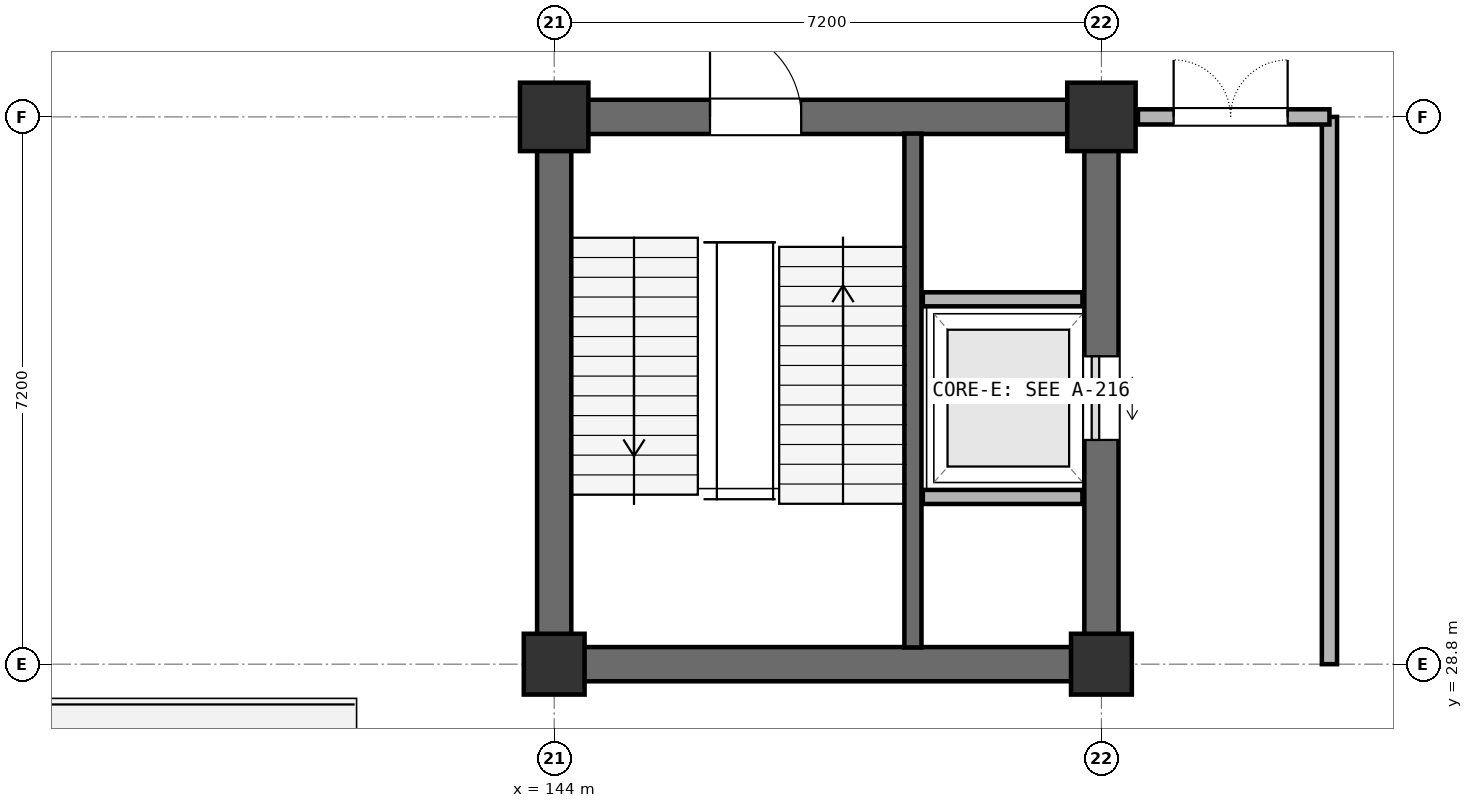
"""IFC4 building model, lengths in metres.
Left out: names, types, materials, properties, quantities, classifications, styles, units other than length and angle.
Written with IfcOpenShell. Run it as: python <this file> out.ifc"""

import sys

from ifc_helpers import new_model, si_unit, direction, frame, frame_2d, origin, origin_2d, place, context, subcontext, project, spatial, rectangle, extrude, element, fill, save


model = new_model("IFC4")
c1 = context("Model", 3, precision=1e-05, world=origin(), true_north=direction((0.0, 1.0)))
c2 = subcontext(c1, "Body", "Model", "MODEL_VIEW")
j1 = project(units=[si_unit("LENGTHUNIT", "METRE"), si_unit("PLANEANGLEUNIT", "RADIAN")], contexts=[c1])
p1 = place(None, origin())
s1 = spatial("IfcSite", under=j1, at=p1, CompositionType="ELEMENT")
p2 = place(p1, origin())
s2 = spatial("IfcBuilding", under=s1, at=p2, CompositionType="ELEMENT")
p3 = place(p2, frame((0.0, 0.0, -4.8)))
s3 = spatial("IfcBuildingStorey", under=s2, at=p3, CompositionType="ELEMENT", Elevation=-4.8)
p4 = place(p3, frame((144.0, 28.8, 0.0), z_axis=(0.0, 0.0, 1.0), x_axis=(1.0, 0.0, 0.0)))
e1 = element("IfcColumn", 1, at=p4, inside=s3, PredefinedType="COLUMN", context=c2, shape_type="SweptSolid", body=[
    extrude(rectangle(XDim=0.8, YDim=0.8, at=origin_2d()), origin(), (0.0, 0.0, 1.0), 4.8),
])
p5 = place(p3, frame((144.0, 36.0, 0.0), z_axis=(0.0, 0.0, 1.0), x_axis=(1.0, 0.0, 0.0)))
e2 = element("IfcColumn", 2, at=p5, inside=s3, PredefinedType="COLUMN", context=c2, shape_type="SweptSolid", body=[
    extrude(rectangle(XDim=0.9, YDim=0.9, at=origin_2d()), origin(), (0.0, 0.0, 1.0), 4.8),
])
p6 = place(p3, frame((151.2, 28.8, 0.0), z_axis=(0.0, 0.0, 1.0), x_axis=(1.0, 0.0, 0.0)))
e3 = element("IfcColumn", 3, at=p6, inside=s3, PredefinedType="COLUMN", context=c2, shape_type="SweptSolid", body=[
    extrude(rectangle(XDim=0.8, YDim=0.8, at=origin_2d()), origin(), (0.0, 0.0, 1.0), 4.8),
])
p7 = place(p3, frame((151.2, 36.0, 0.0), z_axis=(0.0, 0.0, 1.0), x_axis=(1.0, 0.0, 0.0)))
e4 = element("IfcColumn", 4, at=p7, inside=s3, PredefinedType="COLUMN", context=c2, shape_type="SweptSolid", body=[
    extrude(rectangle(XDim=0.9, YDim=0.9, at=origin_2d()), origin(), (0.0, 0.0, 1.0), 4.8),
])
p8 = place(p3, frame((144.35, 28.8, 0.0), z_axis=(0.0, 0.0, 1.0), x_axis=(1.0, 0.0, 0.0)))
e5 = element("IfcWall", 5, at=p8, inside=s3, PredefinedType="SHEAR", context=c2, shape_type="SweptSolid", body=[
    extrude(rectangle(XDim=6.5, YDim=0.45, at=frame_2d((3.25, 0.0))), origin(), (0.0, 0.0, 1.0), 4.8),
])
p9 = place(p3, frame((151.2, 29.15, 0.0), z_axis=(0.0, 0.0, 1.0), x_axis=(0.0, 1.0, 0.0)))
e6 = element("IfcWall", 6, at=p9, inside=s3, PredefinedType="SHEAR", context=c2, shape_type="SweptSolid", body=[
    extrude(rectangle(XDim=6.5, YDim=0.45, at=frame_2d((3.25, 0.0))), origin(), (0.0, 0.0, 1.0), 4.8),
])
p10 = place(p9, frame((2.6, 0.0, 0.0)))
e7 = element("IfcOpeningElement", 7, at=p10, cuts=e6, PredefinedType="OPENING", context=c2, shape_type="SweptSolid", body=[
    extrude(rectangle(XDim=1.1, YDim=2.2, at=frame_2d((0.55, 1.1))), frame((0.0, 0.235, 0.0), z_axis=(0.0, -1.0, 0.0), x_axis=(1.0, 0.0, 0.0)), (0.0, 0.0, 1.0), 0.47),
])
p11 = place(p3, frame((150.85, 36.0, 0.0), z_axis=(0.0, 0.0, 1.0), x_axis=(-1.0, 0.0, 0.0)))
e8 = element("IfcWall", 8, at=p11, inside=s3, PredefinedType="SHEAR", context=c2, shape_type="SweptSolid", body=[
    extrude(rectangle(XDim=6.5, YDim=0.45, at=frame_2d((3.25, 0.0))), origin(), (0.0, 0.0, 1.0), 4.8),
])
p12 = place(p11, frame((3.6, 0.0, 0.0)))
e9 = element("IfcOpeningElement", 9, at=p12, cuts=e8, PredefinedType="OPENING", context=c2, shape_type="SweptSolid", body=[
    extrude(rectangle(XDim=1.2, YDim=2.2, at=frame_2d((0.6, 1.1))), frame((0.0, 0.235, 0.0), z_axis=(0.0, -1.0, 0.0), x_axis=(1.0, 0.0, 0.0)), (0.0, 0.0, 1.0), 0.47),
])
p13 = place(p3, frame((144.0, 35.65, 0.0), z_axis=(0.0, 0.0, 1.0), x_axis=(0.0, -1.0, 0.0)))
e10 = element("IfcWall", 10, at=p13, inside=s3, PredefinedType="SHEAR", context=c2, shape_type="SweptSolid", body=[
    extrude(rectangle(XDim=6.5, YDim=0.45, at=frame_2d((3.25, 0.0))), origin(), (0.0, 0.0, 1.0), 4.8),
])
p14 = place(p3, frame((148.72, 29.02, 0.0), z_axis=(0.0, 0.0, 1.0), x_axis=(0.0, 1.0, 0.0)))
e11 = element("IfcWall", 11, at=p14, inside=s3, PredefinedType="SHEAR", context=c2, shape_type="SweptSolid", body=[
    extrude(rectangle(XDim=6.76, YDim=0.225, at=frame_2d((3.38, 0.0))), origin(), (0.0, 0.0, 1.0), 4.8),
])
for number, where, z_axis, x_axis in (
    (12, (148.85, 31.0, 0.0), (0.0, 0.0, 1.0), (1.0, 0.0, 0.0)),
    (13, (148.85, 33.6, 0.0), (0.0, 0.0, 1.0), (1.0, 0.0, 0.0)),
):
    element("IfcWall", number, at=place(p3, frame(where, z_axis=z_axis, x_axis=x_axis)), inside=s3, PredefinedType="PARTITIONING", context=c2, shape_type="SweptSolid", body=[
        extrude(rectangle(XDim=2.1, YDim=0.185, at=frame_2d((1.05, 0.0))), origin(), (0.0, 0.0, 1.0), 4.8),
    ])
p15 = place(p3, frame((154.2, 28.8, 0.0), z_axis=(0.0, 0.0, 1.0), x_axis=(0.0, 1.0, 0.0)))
e14 = element("IfcWall", 14, at=p15, inside=s3, PredefinedType="PARTITIONING", context=c2, shape_type="SweptSolid", body=[
    extrude(rectangle(XDim=7.2, YDim=0.2, at=frame_2d((3.6, 0.0))), origin(), (0.0, 0.0, 1.0), 3.52),
])
p16 = place(p3, frame((154.2, 36.0, 0.0), z_axis=(0.0, 0.0, 1.0), x_axis=(-1.0, 0.0, 0.0)))
e15 = element("IfcWall", 15, at=p16, inside=s3, PredefinedType="PARTITIONING", context=c2, shape_type="SweptSolid", body=[
    extrude(rectangle(XDim=2.52, YDim=0.2, at=frame_2d((1.26, 0.0))), origin(), (0.0, 0.0, 1.0), 3.52),
])
p17 = place(p16, frame((0.55, 0.0, 0.0)))
e16 = element("IfcOpeningElement", 16, at=p17, cuts=e15, PredefinedType="OPENING", context=c2, shape_type="SweptSolid", body=[
    extrude(rectangle(XDim=1.5, YDim=2.2, at=frame_2d((0.75, 1.1))), frame((0.0, 0.11, 0.0), z_axis=(0.0, -1.0, 0.0), x_axis=(1.0, 0.0, 0.0)), (0.0, 0.0, 1.0), 0.22),
])
p18 = place(p10, origin())
e17 = element("IfcDoor", 17, at=p18, inside=s3, OperationType="SLIDING_TO_LEFT", PredefinedType="DOOR", context=c2, shape_type="SweptSolid", body=[
    extrude(rectangle(XDim=1.1, YDim=2.2, at=frame_2d((0.55, 1.1))), frame((0.0, 0.025, 0.0), z_axis=(0.0, -1.0, 0.0), x_axis=(1.0, 0.0, 0.0)), (0.0, 0.0, 1.0), 0.05),
])
fill(e7, e17)
p19 = place(p12, frame((1.2, 0.0, 0.0), z_axis=(0.0, 0.0, 1.0), x_axis=(-1.0, 0.0, 0.0)))
e18 = element("IfcDoor", 18, at=p19, inside=s3, OperationType="SINGLE_SWING_LEFT", PredefinedType="DOOR", context=c2, shape_type="SweptSolid", body=[
    extrude(rectangle(XDim=1.2, YDim=2.2, at=frame_2d((0.6, 1.1))), frame((0.0, 0.025, 0.0), z_axis=(0.0, -1.0, 0.0), x_axis=(1.0, 0.0, 0.0)), (0.0, 0.0, 1.0), 0.05),
])
fill(e9, e18)
p20 = place(p17, frame((1.5, 0.0, 0.0), z_axis=(0.0, 0.0, 1.0), x_axis=(-1.0, 0.0, 0.0)))
e19 = element("IfcDoor", 19, at=p20, inside=s3, OperationType="DOUBLE_DOOR_SINGLE_SWING", PredefinedType="DOOR", context=c2, shape_type="SweptSolid", body=[
    extrude(rectangle(XDim=1.5, YDim=2.2, at=frame_2d((0.75, 1.1))), frame((0.0, 0.025, 0.0), z_axis=(0.0, -1.0, 0.0), x_axis=(1.0, 0.0, 0.0)), (0.0, 0.0, 1.0), 0.05),
])
fill(e16, e19)
save(model, sys.argv[1])
